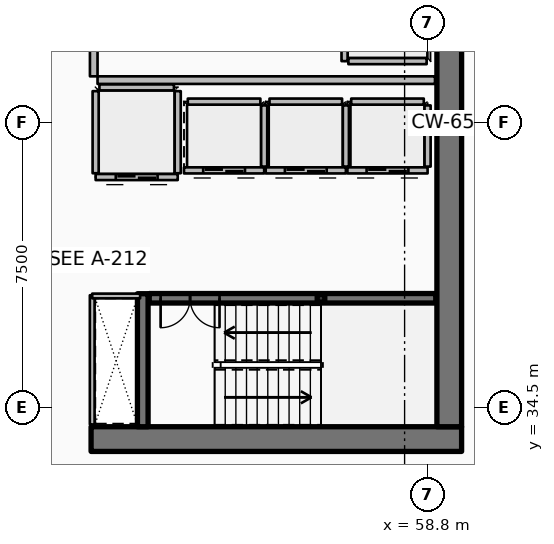
"""IFC4 building model, lengths in metres.
Left out: names, types, materials, properties, quantities, classifications, styles, units other than length and angle.
Written with IfcOpenShell. Run it as: python <this file> out.ifc"""

import sys

from ifc_helpers import new_model, si_unit, direction, frame, frame_2d, origin, origin_2d, place, context, subcontext, project, spatial, rectangle, hollow_rectangle, extrude, element, fill, save


model = new_model("IFC4")
c1 = context("Model", 3, precision=1e-05, world=origin(), true_north=direction((0.0, 1.0)))
c2 = subcontext(c1, "Body", "Model", "MODEL_VIEW")
j1 = project(units=[si_unit("LENGTHUNIT", "METRE"), si_unit("PLANEANGLEUNIT", "RADIAN")], contexts=[c1])
p1 = place(None, origin())
s1 = spatial("IfcSite", under=j1, at=p1, CompositionType="ELEMENT")
p2 = place(p1, origin())
s2 = spatial("IfcBuilding", under=s1, at=p2, CompositionType="ELEMENT")
p3 = place(p2, frame((0.0, 0.0, 271.35)))
s3 = spatial("IfcBuildingStorey", under=s2, at=p3, CompositionType="ELEMENT", Elevation=271.35)
p4 = place(p3, frame((49.95, 33.675, 0.0), z_axis=(0.0, 0.0, 1.0), x_axis=(1.0, 0.0, 0.0)))
e1 = element("IfcWall", 1, at=p4, inside=s3, PredefinedType="SHEAR", context=c2, shape_type="SweptSolid", body=[
    extrude(rectangle(XDim=9.75, YDim=0.65, at=frame_2d((4.875, 0.0))), origin(), (0.0, 0.0, 1.0), 3.85),
])
p5 = place(p3, frame((59.375, 34.0, 0.0), z_axis=(0.0, 0.0, 1.0), x_axis=(0.0, 1.0, 0.0)))
e2 = element("IfcWall", 2, at=p5, inside=s3, PredefinedType="SHEAR", context=c2, shape_type="SweptSolid", body=[
    extrude(rectangle(XDim=16.0, YDim=0.65, at=frame_2d((8.0, 0.0))), origin(), (0.0, 0.0, 1.0), 3.85),
])
p6 = place(p3, frame((51.31, 34.0, 0.0), z_axis=(0.0, 0.0, 1.0), x_axis=(0.0, 1.0, 0.0)))
e3 = element("IfcWall", 3, at=p6, inside=s3, PredefinedType="SHEAR", context=c2, shape_type="SweptSolid", body=[
    extrude(rectangle(XDim=3.5, YDim=0.28, at=frame_2d((1.75, 0.0))), origin(), (0.0, 0.0, 1.0), 3.85),
])
p7 = place(p3, frame((56.0, 37.38, 0.0), z_axis=(0.0, 0.0, 1.0), x_axis=(1.0, 0.0, 0.0)))
e4 = element("IfcColumn", 4, at=p7, inside=s3, PredefinedType="COLUMN", context=c2, shape_type="SweptSolid", body=[
    extrude(hollow_rectangle(XDim=0.2, YDim=0.2, WallThickness=0.01, InnerFilletRadius=0.01, OuterFilletRadius=0.02, at=origin_2d()), origin(), (0.0, 0.0, 1.0), 1.72),
])
p8 = place(p3, frame((51.48, 37.38, 0.0), z_axis=(0.0, 0.0, 1.0), x_axis=(1.0, 0.0, 0.0)))
e5 = element("IfcWall", 5, at=p8, inside=s3, PredefinedType="SOLIDWALL", context=c2, shape_type="SweptSolid", body=[
    extrude(rectangle(XDim=7.54, YDim=0.25, at=frame_2d((3.77, 0.0))), origin(), (0.0, 0.0, 1.0), 3.59),
])
p9 = place(p8, frame((0.3, 0.0, 0.0)))
e6 = element("IfcOpeningElement", 6, at=p9, cuts=e5, PredefinedType="OPENING", context=c2, shape_type="SweptSolid", body=[
    extrude(rectangle(XDim=1.55, YDim=2.15, at=frame_2d((0.775, 1.075))), frame((0.0, 0.135, 0.0), z_axis=(0.0, -1.0, 0.0), x_axis=(1.0, 0.0, 0.0)), (0.0, 0.0, 1.0), 0.27),
])
p10 = place(p3, frame((54.505, 40.745, 0.0), z_axis=(0.0, 0.0, 1.0), x_axis=(-1.0, 0.0, 0.0)))
e7 = element("IfcWall", 7, at=p10, inside=s3, PredefinedType="PARTITIONING", context=c2, shape_type="SweptSolid", body=[
    extrude(rectangle(XDim=2.11, YDim=0.16, at=frame_2d((1.055, 0.0))), origin(), (0.0, 0.0, 1.0), 3.59),
])
p11 = place(p10, frame((0.505, 0.0, 0.0)))
e8 = element("IfcOpeningElement", 8, at=p11, cuts=e7, PredefinedType="OPENING", context=c2, shape_type="SweptSolid", body=[
    extrude(rectangle(XDim=1.1, YDim=2.1, at=frame_2d((0.55, 1.05))), frame((0.0, 0.09, 0.0), z_axis=(0.0, -1.0, 0.0), x_axis=(1.0, 0.0, 0.0)), (0.0, 0.0, 1.0), 0.18),
])
p12 = place(p3, frame((54.505, 40.845, 0.0), z_axis=(0.0, 0.0, 1.0), x_axis=(0.0, 1.0, 0.0)))
e9 = element("IfcWall", 9, at=p12, inside=s3, PredefinedType="PARTITIONING", context=c2, shape_type="SweptSolid", body=[
    extrude(rectangle(XDim=1.61, YDim=0.16, at=frame_2d((0.805, 0.0))), origin(), (0.0, 0.0, 1.0), 3.59),
])
p13 = place(p3, frame((52.495, 42.555, 0.0), z_axis=(0.0, 0.0, 1.0), x_axis=(1.0, 0.0, 0.0)))
e10 = element("IfcWall", 10, at=p13, inside=s3, PredefinedType="PARTITIONING", context=c2, shape_type="SweptSolid", body=[
    extrude(rectangle(XDim=1.91, YDim=0.16, at=frame_2d((0.955, 0.0))), origin(), (0.0, 0.0, 1.0), 3.59),
])
p14 = place(p3, frame((56.655, 40.745, 0.0), z_axis=(0.0, 0.0, 1.0), x_axis=(-1.0, 0.0, 0.0)))
e11 = element("IfcWall", 11, at=p14, inside=s3, PredefinedType="PARTITIONING", context=c2, shape_type="SweptSolid", body=[
    extrude(rectangle(XDim=2.11, YDim=0.16, at=frame_2d((1.055, 0.0))), origin(), (0.0, 0.0, 1.0), 3.59),
])
p15 = place(p14, frame((0.505, 0.0, 0.0)))
e12 = element("IfcOpeningElement", 12, at=p15, cuts=e11, PredefinedType="OPENING", context=c2, shape_type="SweptSolid", body=[
    extrude(rectangle(XDim=1.1, YDim=2.1, at=frame_2d((0.55, 1.05))), frame((0.0, 0.09, 0.0), z_axis=(0.0, -1.0, 0.0), x_axis=(1.0, 0.0, 0.0)), (0.0, 0.0, 1.0), 0.18),
])
p16 = place(p3, frame((56.655, 40.845, 0.0), z_axis=(0.0, 0.0, 1.0), x_axis=(0.0, 1.0, 0.0)))
e13 = element("IfcWall", 13, at=p16, inside=s3, PredefinedType="PARTITIONING", context=c2, shape_type="SweptSolid", body=[
    extrude(rectangle(XDim=1.61, YDim=0.16, at=frame_2d((0.805, 0.0))), origin(), (0.0, 0.0, 1.0), 3.59),
])
p17 = place(p3, frame((54.645, 42.555, 0.0), z_axis=(0.0, 0.0, 1.0), x_axis=(1.0, 0.0, 0.0)))
e14 = element("IfcWall", 14, at=p17, inside=s3, PredefinedType="PARTITIONING", context=c2, shape_type="SweptSolid", body=[
    extrude(rectangle(XDim=1.91, YDim=0.16, at=frame_2d((0.955, 0.0))), origin(), (0.0, 0.0, 1.0), 3.59),
])
p18 = place(p3, frame((58.805, 40.745, 0.0), z_axis=(0.0, 0.0, 1.0), x_axis=(-1.0, 0.0, 0.0)))
e15 = element("IfcWall", 15, at=p18, inside=s3, PredefinedType="PARTITIONING", context=c2, shape_type="SweptSolid", body=[
    extrude(rectangle(XDim=2.11, YDim=0.16, at=frame_2d((1.055, 0.0))), origin(), (0.0, 0.0, 1.0), 3.59),
])
p19 = place(p18, frame((0.505, 0.0, 0.0)))
e16 = element("IfcOpeningElement", 16, at=p19, cuts=e15, PredefinedType="OPENING", context=c2, shape_type="SweptSolid", body=[
    extrude(rectangle(XDim=1.1, YDim=2.1, at=frame_2d((0.55, 1.05))), frame((0.0, 0.09, 0.0), z_axis=(0.0, -1.0, 0.0), x_axis=(1.0, 0.0, 0.0)), (0.0, 0.0, 1.0), 0.18),
])
p20 = place(p3, frame((58.805, 40.845, 0.0), z_axis=(0.0, 0.0, 1.0), x_axis=(0.0, 1.0, 0.0)))
e17 = element("IfcWall", 17, at=p20, inside=s3, PredefinedType="PARTITIONING", context=c2, shape_type="SweptSolid", body=[
    extrude(rectangle(XDim=1.61, YDim=0.16, at=frame_2d((0.805, 0.0))), origin(), (0.0, 0.0, 1.0), 3.59),
])
p21 = place(p3, frame((56.795, 42.555, 0.0), z_axis=(0.0, 0.0, 1.0), x_axis=(1.0, 0.0, 0.0)))
e18 = element("IfcWall", 18, at=p21, inside=s3, PredefinedType="PARTITIONING", context=c2, shape_type="SweptSolid", body=[
    extrude(rectangle(XDim=1.91, YDim=0.16, at=frame_2d((0.955, 0.0))), origin(), (0.0, 0.0, 1.0), 3.59),
])
p22 = place(p3, frame((56.62, 46.08, 0.0), z_axis=(0.0, 0.0, 1.0), x_axis=(0.0, -1.0, 0.0)))
e19 = element("IfcWall", 19, at=p22, inside=s3, PredefinedType="PARTITIONING", context=c2, shape_type="SweptSolid", body=[
    extrude(rectangle(XDim=2.46, YDim=0.16, at=frame_2d((1.23, 0.0))), origin(), (0.0, 0.0, 1.0), 3.59),
])
p23 = place(p22, frame((0.68, 0.0, 0.0)))
e20 = element("IfcOpeningElement", 20, at=p23, cuts=e19, PredefinedType="OPENING", context=c2, shape_type="SweptSolid", body=[
    extrude(rectangle(XDim=1.1, YDim=2.1, at=frame_2d((0.55, 1.05))), frame((0.0, 0.09, 0.0), z_axis=(0.0, -1.0, 0.0), x_axis=(1.0, 0.0, 0.0)), (0.0, 0.0, 1.0), 0.18),
])
p24 = place(p3, frame((56.72, 43.62, 0.0), z_axis=(0.0, 0.0, 1.0), x_axis=(1.0, 0.0, 0.0)))
e21 = element("IfcWall", 21, at=p24, inside=s3, PredefinedType="PARTITIONING", context=c2, shape_type="SweptSolid", body=[
    extrude(rectangle(XDim=2.06, YDim=0.16, at=frame_2d((1.03, 0.0))), origin(), (0.0, 0.0, 1.0), 3.59),
])
p25 = place(p3, frame((52.23, 40.57, 0.0), z_axis=(0.0, 0.0, 1.0), x_axis=(-1.0, 0.0, 0.0)))
e22 = element("IfcWall", 22, at=p25, inside=s3, PredefinedType="PARTITIONING", context=c2, shape_type="SweptSolid", body=[
    extrude(rectangle(XDim=2.16, YDim=0.16, at=frame_2d((1.08, 0.0))), origin(), (0.0, 0.0, 1.0), 3.59),
])
p26 = place(p25, frame((0.53, 0.0, 0.0)))
e23 = element("IfcOpeningElement", 23, at=p26, cuts=e22, PredefinedType="OPENING", context=c2, shape_type="SweptSolid", body=[
    extrude(rectangle(XDim=1.1, YDim=2.1, at=frame_2d((0.55, 1.05))), frame((0.0, 0.09, 0.0), z_axis=(0.0, -1.0, 0.0), x_axis=(1.0, 0.0, 0.0)), (0.0, 0.0, 1.0), 0.18),
])
for number, where, z_axis, x_axis in (
    (24, (52.23, 40.67, 0.0), (0.0, 0.0, 1.0), (0.0, 1.0, 0.0)),
    (25, (50.07, 40.67, 0.0), (0.0, 0.0, 1.0), (0.0, 1.0, 0.0)),
):
    element("IfcWall", number, at=place(p3, frame(where, z_axis=z_axis, x_axis=x_axis)), inside=s3, PredefinedType="PARTITIONING", context=c2, shape_type="SweptSolid", body=[
        extrude(rectangle(XDim=2.16, YDim=0.16, at=frame_2d((1.08, 0.0))), origin(), (0.0, 0.0, 1.0), 3.59),
    ])
p27 = place(p3, frame((50.17, 42.93, 0.0), z_axis=(0.0, 0.0, 1.0), x_axis=(1.0, 0.0, 0.0)))
e26 = element("IfcWall", 26, at=p27, inside=s3, PredefinedType="PARTITIONING", context=c2, shape_type="SweptSolid", body=[
    extrude(rectangle(XDim=1.96, YDim=0.16, at=frame_2d((0.98, 0.0))), origin(), (0.0, 0.0, 1.0), 3.59),
])
p28 = place(p3, frame((50.12, 43.12, 0.0), z_axis=(0.0, 0.0, 1.0), x_axis=(1.0, 0.0, 0.0)))
e27 = element("IfcWall", 27, at=p28, inside=s3, PredefinedType="PARTITIONING", context=c2, shape_type="SweptSolid", body=[
    extrude(rectangle(XDim=8.88, YDim=0.2, at=frame_2d((4.44, 0.0))), origin(), (0.0, 0.0, 1.0), 3.59),
])
p29 = place(p3, frame((50.02, 43.22, 0.0), z_axis=(0.0, 0.0, 1.0), x_axis=(0.0, 1.0, 0.0)))
e28 = element("IfcWall", 28, at=p29, inside=s3, PredefinedType="PARTITIONING", context=c2, shape_type="SweptSolid", body=[
    extrude(rectangle(XDim=3.3, YDim=0.2, at=frame_2d((1.65, 0.0))), origin(), (0.0, 0.0, 1.0), 3.59),
])
p30 = place(p29, frame((1.125, 0.0, 0.0)))
e29 = element("IfcOpeningElement", 29, at=p30, cuts=e28, PredefinedType="OPENING", context=c2, shape_type="SweptSolid", body=[
    extrude(rectangle(XDim=1.05, YDim=2.1, at=frame_2d((0.525, 1.05))), frame((0.0, 0.11, 0.0), z_axis=(0.0, -1.0, 0.0), x_axis=(1.0, 0.0, 0.0)), (0.0, 0.0, 1.0), 0.22),
])
p31 = place(p3, frame((49.98, 34.06, 0.0), z_axis=(0.0, 0.0, 1.0), x_axis=(0.0, 1.0, 0.0)))
e30 = element("IfcWall", 30, at=p31, inside=s3, PredefinedType="PARTITIONING", context=c2, shape_type="SweptSolid", body=[
    extrude(rectangle(XDim=3.4, YDim=0.125, at=frame_2d((1.7, 0.0))), origin(), (0.0, 0.0, 1.0), 3.03),
])
p32 = place(p3, frame((49.98, 37.44, 0.0), z_axis=(0.0, 0.0, 1.0), x_axis=(1.0, 0.0, 0.0)))
e31 = element("IfcWall", 31, at=p32, inside=s3, PredefinedType="PARTITIONING", context=c2, shape_type="SweptSolid", body=[
    extrude(rectangle(XDim=1.26, YDim=0.125, at=frame_2d((0.63, 0.0))), origin(), (0.0, 0.0, 1.0), 3.03),
])
p33 = place(p9, origin())
e32 = element("IfcDoor", 32, at=p33, inside=s3, OperationType="DOUBLE_DOOR_SINGLE_SWING", PredefinedType="DOOR", context=c2, shape_type="SweptSolid", body=[
    extrude(rectangle(XDim=1.55, YDim=2.15, at=frame_2d((0.775, 1.075))), frame((0.0, 0.025, 0.0), z_axis=(0.0, -1.0, 0.0), x_axis=(1.0, 0.0, 0.0)), (0.0, 0.0, 1.0), 0.05),
])
fill(e6, e32)
p34 = place(p11, origin())
e33 = element("IfcDoor", 33, at=p34, inside=s3, OperationType="DOUBLE_DOOR_SLIDING", PredefinedType="DOOR", context=c2, shape_type="SweptSolid", body=[
    extrude(rectangle(XDim=1.1, YDim=2.1, at=frame_2d((0.55, 1.05))), frame((0.0, 0.025, 0.0), z_axis=(0.0, -1.0, 0.0), x_axis=(1.0, 0.0, 0.0)), (0.0, 0.0, 1.0), 0.05),
])
fill(e8, e33)
p35 = place(p15, origin())
e34 = element("IfcDoor", 34, at=p35, inside=s3, OperationType="DOUBLE_DOOR_SLIDING", PredefinedType="DOOR", context=c2, shape_type="SweptSolid", body=[
    extrude(rectangle(XDim=1.1, YDim=2.1, at=frame_2d((0.55, 1.05))), frame((0.0, 0.025, 0.0), z_axis=(0.0, -1.0, 0.0), x_axis=(1.0, 0.0, 0.0)), (0.0, 0.0, 1.0), 0.05),
])
fill(e12, e34)
p36 = place(p19, origin())
e35 = element("IfcDoor", 35, at=p36, inside=s3, OperationType="DOUBLE_DOOR_SLIDING", PredefinedType="DOOR", context=c2, shape_type="SweptSolid", body=[
    extrude(rectangle(XDim=1.1, YDim=2.1, at=frame_2d((0.55, 1.05))), frame((0.0, 0.025, 0.0), z_axis=(0.0, -1.0, 0.0), x_axis=(1.0, 0.0, 0.0)), (0.0, 0.0, 1.0), 0.05),
])
fill(e16, e35)
p37 = place(p26, origin())
e36 = element("IfcDoor", 36, at=p37, inside=s3, OperationType="DOUBLE_DOOR_SLIDING", PredefinedType="DOOR", context=c2, shape_type="SweptSolid", body=[
    extrude(rectangle(XDim=1.1, YDim=2.1, at=frame_2d((0.55, 1.05))), frame((0.0, 0.025, 0.0), z_axis=(0.0, -1.0, 0.0), x_axis=(1.0, 0.0, 0.0)), (0.0, 0.0, 1.0), 0.05),
])
fill(e23, e36)
save(model, sys.argv[1])
